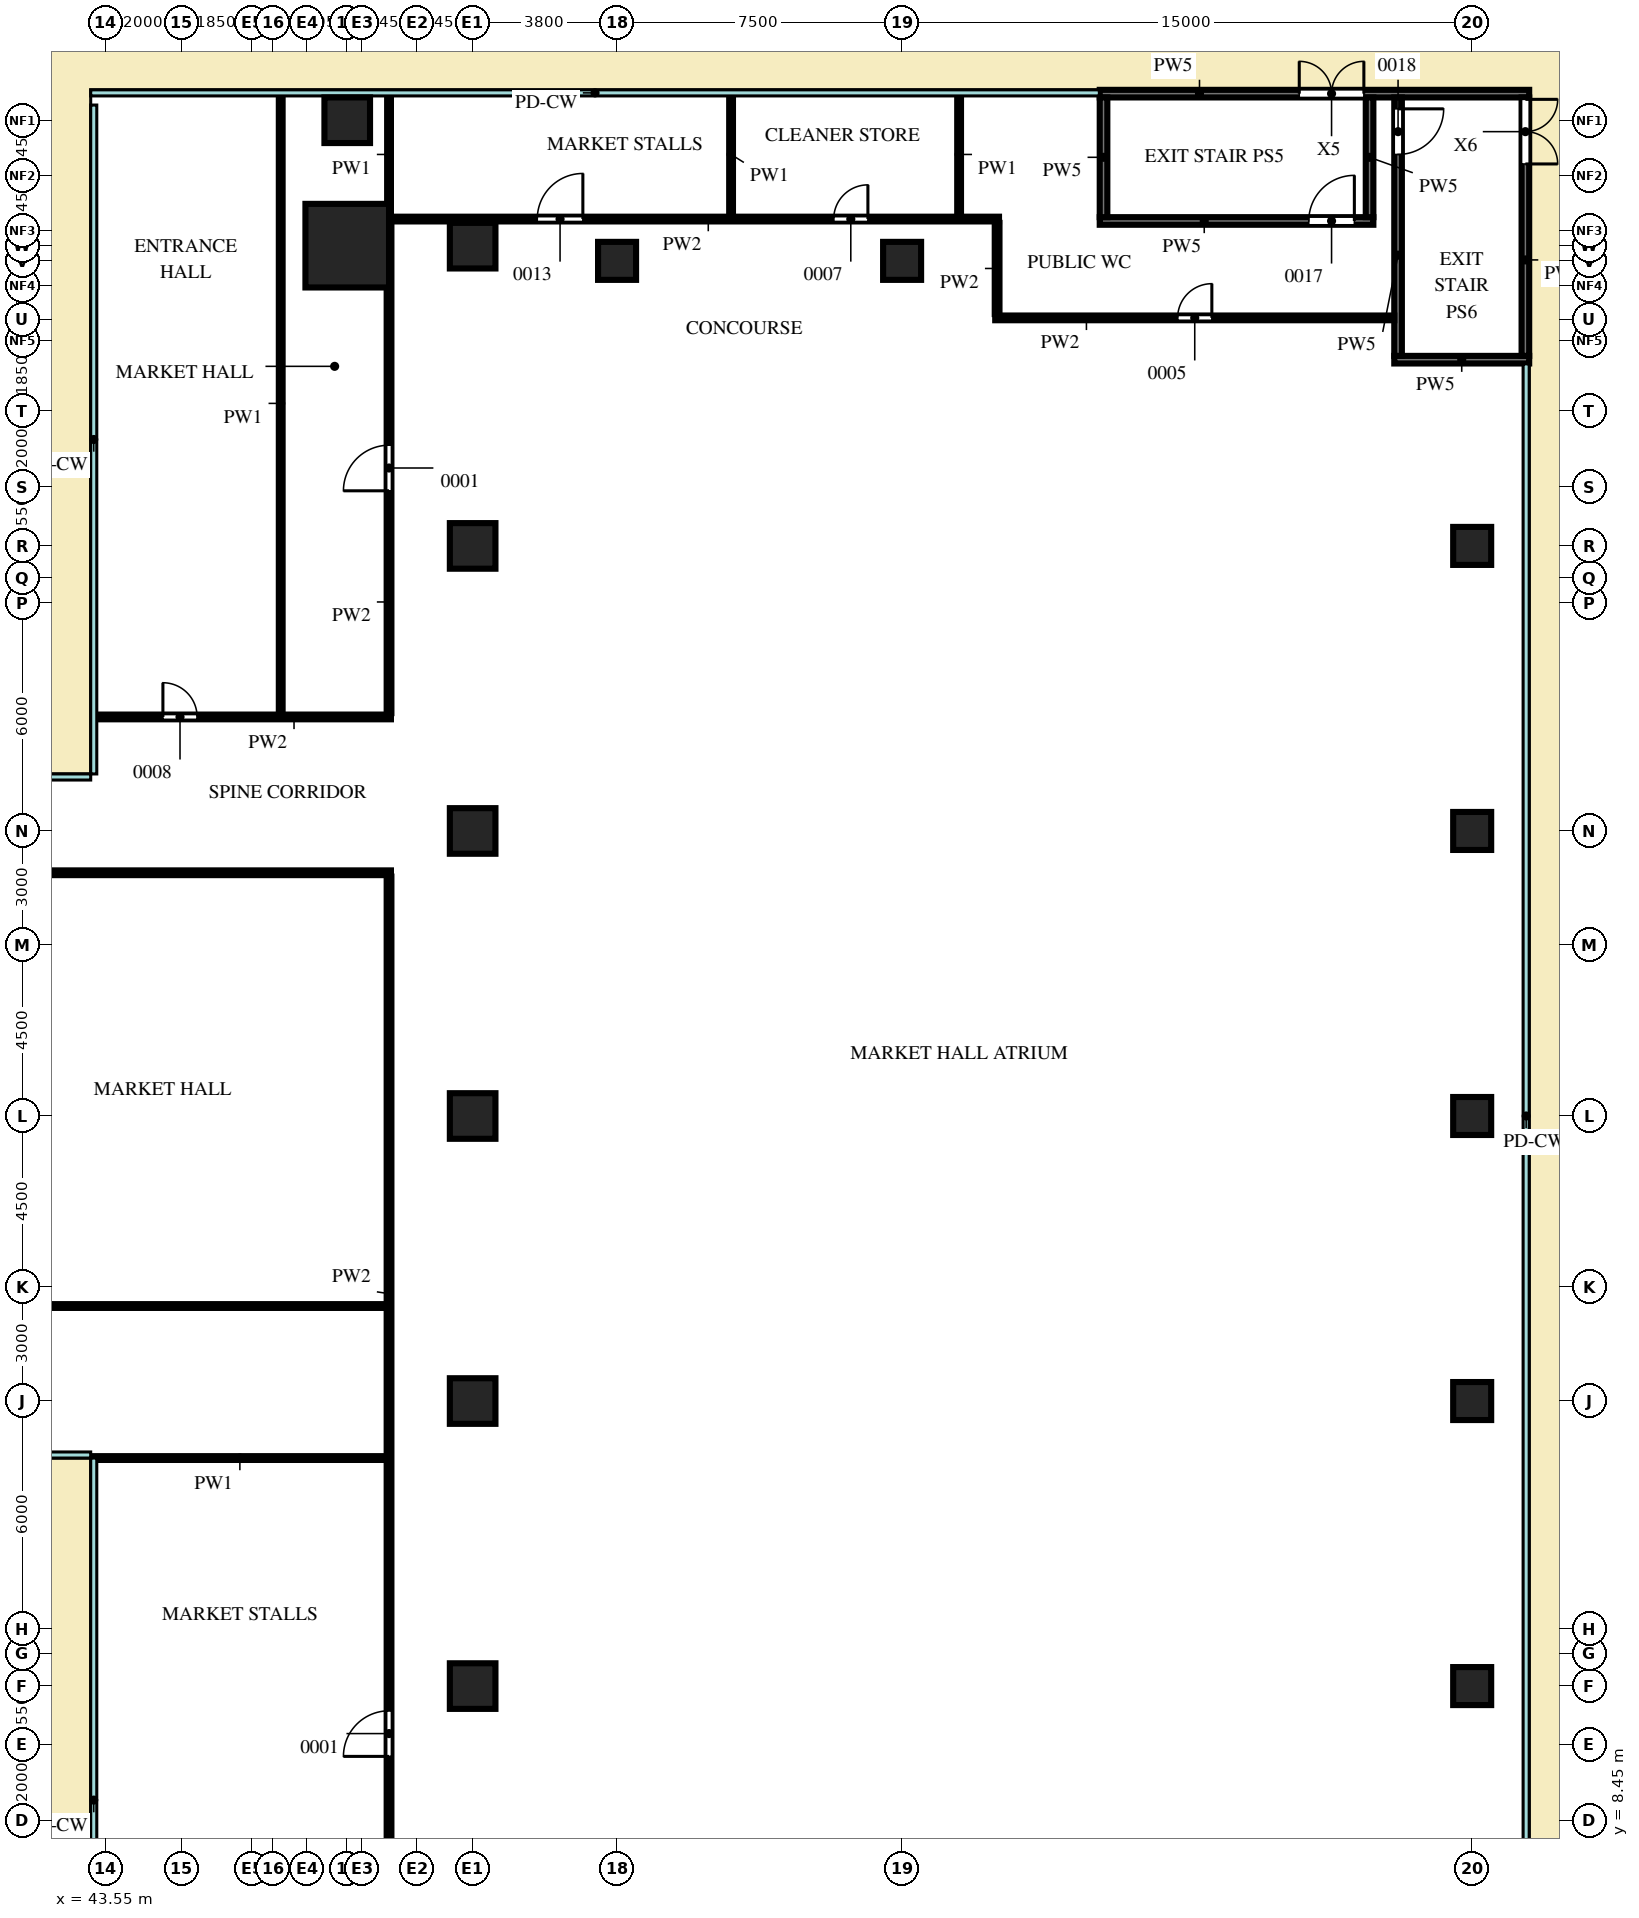
"""IFC4 building model, lengths in metres.
Left out: names, types, materials, properties, quantities, classifications, styles, units other than length and angle.
Written with IfcOpenShell. Run it as: python <this file> out.ifc"""

import sys

from ifc_helpers import new_model, si_unit, direction, frame, frame_2d, origin, origin_2d, place, context, subcontext, project, spatial, rectangle, extrude, source, transform, mapped, element, fill, save


model = new_model("IFC4")
c1 = context("Model", 3, precision=1e-05, world=origin(), true_north=direction((0.0, 1.0)))
c2 = subcontext(c1, "Body", "Model", "MODEL_VIEW")
j1 = project(units=[si_unit("LENGTHUNIT", "METRE"), si_unit("PLANEANGLEUNIT", "RADIAN")], contexts=[c1])
p1 = place(None, origin())
s1 = spatial("IfcSite", under=j1, at=p1, CompositionType="ELEMENT")
p2 = place(p1, origin())
s2 = spatial("IfcBuilding", under=s1, at=p2, CompositionType="ELEMENT")
p3 = place(p2, origin())
s3 = spatial("IfcBuildingStorey", under=s2, at=p3, CompositionType="ELEMENT", Elevation=0.0)
m1 = source(origin(), c2, "Body", "SweptSolid", [
    extrude(rectangle(XDim=2.2, YDim=2.2, at=origin_2d()), origin(), (0.0, 0.0, 1.0), 7.2),
])
p4 = place(p3, frame((49.9, 49.9, 0.0), z_axis=(0.0, 0.0, 1.0), x_axis=(1.0, 0.0, 0.0)))
e1 = element("IfcColumn", 1, at=p4, inside=s3, PredefinedType="COLUMN", context=c2, shape_type="MappedRepresentation", body=[
    mapped(m1, transform((0.0, 0.0, 0.0))),
])
m2 = source(origin(), c2, "Body", "SweptSolid", [
    extrude(rectangle(XDim=1.2, YDim=1.2, at=origin_2d()), origin(), (0.0, 0.0, 1.0), 7.2),
])
for number, where, z_axis, x_axis in (
    (2, (53.2, 12.0, 0.0), (0.0, 0.0, 1.0), (1.0, 0.0, 0.0)),
    (3, (53.2, 19.5, 0.0), (0.0, 0.0, 1.0), (1.0, 0.0, 0.0)),
    (4, (53.2, 27.0, 0.0), (0.0, 0.0, 1.0), (1.0, 0.0, 0.0)),
    (5, (53.2, 34.5, 0.0), (0.0, 0.0, 1.0), (1.0, 0.0, 0.0)),
    (6, (53.2, 42.0, 0.0), (0.0, 0.0, 1.0), (1.0, 0.0, 0.0)),
    (7, (53.2, 49.9, 0.0), (0.0, 0.0, 1.0), (1.0, 0.0, 0.0)),
    (8, (49.9, 53.2, 0.0), (0.0, 0.0, 1.0), (1.0, 0.0, 0.0)),
):
    element("IfcColumn", number, at=place(p3, frame(where, z_axis=z_axis, x_axis=x_axis)), inside=s3, PredefinedType="COLUMN", context=c2, shape_type="MappedRepresentation", body=[
        mapped(m2, transform((0.0, 0.0, 0.0))),
    ])
m3 = source(origin(), c2, "Body", "SweptSolid", [
    extrude(rectangle(XDim=1.0, YDim=1.0, at=origin_2d()), origin(), (0.0, 0.0, 1.0), 7.2),
])
for number, where, z_axis, x_axis in (
    (9, (57.0, 49.5, 0.0), (0.0, 0.0, 1.0), (1.0, 0.0, 0.0)),
    (10, (64.5, 49.5, 0.0), (0.0, 0.0, 1.0), (1.0, 0.0, 0.0)),
    (11, (79.5, 12.0, 0.0), (0.0, 0.0, 1.0), (1.0, 0.0, 0.0)),
    (12, (79.5, 19.5, 0.0), (0.0, 0.0, 1.0), (1.0, 0.0, 0.0)),
    (13, (79.5, 27.0, 0.0), (0.0, 0.0, 1.0), (1.0, 0.0, 0.0)),
    (14, (79.5, 34.5, 0.0), (0.0, 0.0, 1.0), (1.0, 0.0, 0.0)),
    (15, (79.5, 42.0, 0.0), (0.0, 0.0, 1.0), (1.0, 0.0, 0.0)),
):
    element("IfcColumn", number, at=place(p3, frame(where, z_axis=z_axis, x_axis=x_axis)), inside=s3, PredefinedType="COLUMN", context=c2, shape_type="MappedRepresentation", body=[
        mapped(m3, transform((0.0, 0.0, 0.0))),
    ])
m4 = source(origin(), c2, "Body", "SweptSolid", [
    extrude(rectangle(XDim=7.2, YDim=0.2, at=frame_2d((3.6, 0.0))), origin(), (0.0, 0.0, 1.0), 7.2),
])
p5 = place(p3, frame((69.7, 50.55, 0.0), z_axis=(0.0, 0.0, 1.0), x_axis=(1.0, 0.0, 0.0)))
e16 = element("IfcWall", 16, at=p5, inside=s3, PredefinedType="PARTITIONING", context=c2, shape_type="MappedRepresentation", body=[
    mapped(m4, transform((0.0, 0.0, 0.0))),
])
m5 = source(origin(), c2, "Body", "SweptSolid", [
    extrude(rectangle(XDim=1.2, YDim=2.1, at=frame_2d((0.6, 1.05))), frame((0.0, 0.11, 0.0), z_axis=(0.0, -1.0, 0.0), x_axis=(1.0, 0.0, 0.0)), (0.0, 0.0, 1.0), 0.22),
])
p6 = place(p5, frame((5.5, 0.0, 0.0)))
e17 = element("IfcOpeningElement", 17, at=p6, cuts=e16, PredefinedType="OPENING", context=c2, shape_type="MappedRepresentation", body=[
    mapped(m5, transform((0.0, 0.0, 0.0))),
])
m6 = source(origin(), c2, "Body", "SweptSolid", [
    extrude(rectangle(XDim=11.3, YDim=0.2, at=frame_2d((5.65, 0.0))), origin(), (0.0, 0.0, 1.0), 7.2),
])
p7 = place(p3, frame((69.7, 53.9, 0.0), z_axis=(0.0, 0.0, 1.0), x_axis=(1.0, 0.0, 0.0)))
e18 = element("IfcWall", 18, at=p7, inside=s3, PredefinedType="PARTITIONING", context=c2, shape_type="MappedRepresentation", body=[
    mapped(m6, transform((0.0, 0.0, 0.0))),
])
m7 = source(origin(), c2, "Body", "SweptSolid", [
    extrude(rectangle(XDim=1.7, YDim=2.4, at=frame_2d((0.85, 1.2))), frame((0.0, 0.11, 0.0), z_axis=(0.0, -1.0, 0.0), x_axis=(1.0, 0.0, 0.0)), (0.0, 0.0, 1.0), 0.22),
])
p8 = place(p7, frame((5.25, 0.0, 0.0)))
e19 = element("IfcOpeningElement", 19, at=p8, cuts=e18, PredefinedType="OPENING", context=c2, shape_type="MappedRepresentation", body=[
    mapped(m7, transform((0.0, 0.0, 0.0))),
])
m8 = source(origin(), c2, "Body", "SweptSolid", [
    extrude(rectangle(XDim=3.15, YDim=0.2, at=frame_2d((1.575, 0.0))), origin(), (0.0, 0.0, 1.0), 7.2),
])
for number, where, z_axis, x_axis in (
    (20, (69.8, 50.65, 0.0), (0.0, 0.0, 1.0), (0.0, 1.0, 0.0)),
    (21, (76.8, 50.65, 0.0), (0.0, 0.0, 1.0), (0.0, 1.0, 0.0)),
):
    element("IfcWall", number, at=place(p3, frame(where, z_axis=z_axis, x_axis=x_axis)), inside=s3, PredefinedType="PARTITIONING", context=c2, shape_type="MappedRepresentation", body=[
        mapped(m8, transform((0.0, 0.0, 0.0))),
    ])
m9 = source(origin(), c2, "Body", "SweptSolid", [
    extrude(rectangle(XDim=3.55, YDim=0.2, at=frame_2d((1.775, 0.0))), origin(), (0.0, 0.0, 1.0), 7.2),
])
p9 = place(p3, frame((77.45, 46.9, 0.0), z_axis=(0.0, 0.0, 1.0), x_axis=(1.0, 0.0, 0.0)))
e22 = element("IfcWall", 22, at=p9, inside=s3, PredefinedType="PARTITIONING", context=c2, shape_type="MappedRepresentation", body=[
    mapped(m9, transform((0.0, 0.0, 0.0))),
])
m10 = source(origin(), c2, "Body", "SweptSolid", [
    extrude(rectangle(XDim=6.8, YDim=0.2, at=frame_2d((3.4, 0.0))), origin(), (0.0, 0.0, 1.0), 7.2),
])
p10 = place(p3, frame((77.55, 47.0, 0.0), z_axis=(0.0, 0.0, 1.0), x_axis=(0.0, 1.0, 0.0)))
e23 = element("IfcWall", 23, at=p10, inside=s3, PredefinedType="PARTITIONING", context=c2, shape_type="MappedRepresentation", body=[
    mapped(m10, transform((0.0, 0.0, 0.0))),
])
p11 = place(p10, frame((5.3, 0.0, 0.0)))
e24 = element("IfcOpeningElement", 24, at=p11, cuts=e23, PredefinedType="OPENING", context=c2, shape_type="MappedRepresentation", body=[
    mapped(m5, transform((0.0, 0.0, 0.0))),
])
p12 = place(p3, frame((80.9, 47.0, 0.0), z_axis=(0.0, 0.0, 1.0), x_axis=(0.0, 1.0, 0.0)))
e25 = element("IfcWall", 25, at=p12, inside=s3, PredefinedType="PARTITIONING", context=c2, shape_type="MappedRepresentation", body=[
    mapped(m10, transform((0.0, 0.0, 0.0))),
])
p13 = place(p12, frame((6.75, 0.0, 0.0), z_axis=(0.0, 0.0, 1.0), x_axis=(-1.0, 0.0, 0.0)))
e26 = element("IfcOpeningElement", 26, at=p13, cuts=e25, PredefinedType="OPENING", context=c2, shape_type="MappedRepresentation", body=[
    mapped(m7, transform((0.0, 0.0, 0.0))),
])
m11 = source(origin(), c2, "Body", "SweptSolid", [
    extrude(rectangle(XDim=29.7, YDim=0.125, at=frame_2d((14.85, 0.0))), origin(), (0.0, 0.0, 1.0), 7.2),
])
p14 = place(p3, frame((51.0, 3.6, 0.0), z_axis=(0.0, 0.0, 1.0), x_axis=(0.0, 1.0, 0.0)))
e27 = element("IfcWall", 27, at=p14, inside=s3, PredefinedType="PARTITIONING", context=c2, shape_type="MappedRepresentation", body=[
    mapped(m11, transform((0.0, 0.0, 0.0))),
])
m12 = source(origin(), c2, "Body", "SweptSolid", [
    extrude(rectangle(XDim=1.2, YDim=2.1, at=frame_2d((0.6, 1.05))), frame((0.0, 0.073, 0.0), z_axis=(0.0, -1.0, 0.0), x_axis=(1.0, 0.0, 0.0)), (0.0, 0.0, 1.0), 0.145),
])
p15 = place(p14, frame((6.55, 0.0, 0.0)))
e28 = element("IfcOpeningElement", 28, at=p15, cuts=e27, PredefinedType="OPENING", context=c2, shape_type="MappedRepresentation", body=[
    mapped(m12, transform((0.0, 0.0, 0.0))),
])
m13 = source(origin(), c2, "Body", "SweptSolid", [
    extrude(rectangle(XDim=7.65, YDim=0.1, at=frame_2d((3.825, 0.0))), origin(), (0.0, 0.0, 1.0), 7.2),
])
p16 = place(p3, frame((43.25, 18.0, 0.0), z_axis=(0.0, 0.0, 1.0), x_axis=(1.0, 0.0, 0.0)))
e29 = element("IfcWall", 29, at=p16, inside=s3, PredefinedType="PARTITIONING", context=c2, shape_type="MappedRepresentation", body=[
    mapped(m13, transform((0.0, 0.0, 0.0))),
])
m14 = source(origin(), c2, "Body", "SweptSolid", [
    extrude(rectangle(XDim=24.4, YDim=0.1, at=frame_2d((12.2, 0.0))), origin(), (0.0, 0.0, 1.0), 7.2),
])
p17 = place(p3, frame((26.5, 22.0, 0.0), z_axis=(0.0, 0.0, 1.0), x_axis=(1.0, 0.0, 0.0)))
e30 = element("IfcWall", 30, at=p17, inside=s3, PredefinedType="PARTITIONING", context=c2, shape_type="MappedRepresentation", body=[
    mapped(m14, transform((0.0, 0.0, 0.0))),
])
m15 = source(origin(), c2, "Body", "SweptSolid", [
    extrude(rectangle(XDim=24.7, YDim=0.125, at=frame_2d((12.35, 0.0))), origin(), (0.0, 0.0, 1.0), 7.2),
])
p18 = place(p3, frame((26.35, 33.4, 0.0), z_axis=(0.0, 0.0, 1.0), x_axis=(1.0, 0.0, 0.0)))
e31 = element("IfcWall", 31, at=p18, inside=s3, PredefinedType="PARTITIONING", context=c2, shape_type="MappedRepresentation", body=[
    mapped(m15, transform((0.0, 0.0, 0.0))),
])
p19 = place(p18, frame((12.25, 0.0, 0.0)))
e32 = element("IfcOpeningElement", 32, at=p19, cuts=e31, PredefinedType="OPENING", context=c2, shape_type="MappedRepresentation", body=[
    mapped(m12, transform((0.0, 0.0, 0.0))),
])
m16 = source(origin(), c2, "Body", "SweptSolid", [
    extrude(rectangle(XDim=7.8, YDim=0.125, at=frame_2d((3.9, 0.0))), origin(), (0.0, 0.0, 1.0), 7.2),
])
p20 = place(p3, frame((43.25, 37.5, 0.0), z_axis=(0.0, 0.0, 1.0), x_axis=(1.0, 0.0, 0.0)))
e33 = element("IfcWall", 33, at=p20, inside=s3, PredefinedType="PARTITIONING", context=c2, shape_type="MappedRepresentation", body=[
    mapped(m16, transform((0.0, 0.0, 0.0))),
])
m17 = source(origin(), c2, "Body", "SweptSolid", [
    extrude(rectangle(XDim=0.9, YDim=2.1, at=frame_2d((0.45, 1.05))), frame((0.0, 0.073, 0.0), z_axis=(0.0, -1.0, 0.0), x_axis=(1.0, 0.0, 0.0)), (0.0, 0.0, 1.0), 0.145),
])
p21 = place(p20, frame((1.8, 0.0, 0.0)))
e34 = element("IfcOpeningElement", 34, at=p21, cuts=e33, PredefinedType="OPENING", context=c2, shape_type="MappedRepresentation", body=[
    mapped(m17, transform((0.0, 0.0, 0.0))),
])
m18 = source(origin(), c2, "Body", "SweptSolid", [
    extrude(rectangle(XDim=16.3, YDim=0.1, at=frame_2d((8.15, 0.0))), origin(), (0.0, 0.0, 1.0), 7.2),
])
p22 = place(p3, frame((48.15, 37.6, 0.0), z_axis=(0.0, 0.0, 1.0), x_axis=(0.0, 1.0, 0.0)))
e35 = element("IfcWall", 35, at=p22, inside=s3, PredefinedType="PARTITIONING", context=c2, shape_type="MappedRepresentation", body=[
    mapped(m18, transform((0.0, 0.0, 0.0))),
])
m19 = source(origin(), c2, "Body", "SweptSolid", [
    extrude(rectangle(XDim=12.9, YDim=0.125, at=frame_2d((6.45, 0.0))), origin(), (0.0, 0.0, 1.0), 7.2),
])
p23 = place(p3, frame((51.0, 37.6, 0.0), z_axis=(0.0, 0.0, 1.0), x_axis=(0.0, 1.0, 0.0)))
e36 = element("IfcWall", 36, at=p23, inside=s3, PredefinedType="PARTITIONING", context=c2, shape_type="MappedRepresentation", body=[
    mapped(m19, transform((0.0, 0.0, 0.0))),
])
p24 = place(p23, frame((5.85, 0.0, 0.0)))
e37 = element("IfcOpeningElement", 37, at=p24, cuts=e36, PredefinedType="OPENING", context=c2, shape_type="MappedRepresentation", body=[
    mapped(m12, transform((0.0, 0.0, 0.0))),
])
m20 = source(origin(), c2, "Body", "SweptSolid", [
    extrude(rectangle(XDim=10.5, YDim=0.125, at=frame_2d((5.25, 0.0))), origin(), (0.0, 0.0, 1.0), 7.2),
])
p25 = place(p3, frame((66.95, 48.0, 0.0), z_axis=(0.0, 0.0, 1.0), x_axis=(1.0, 0.0, 0.0)))
e38 = element("IfcWall", 38, at=p25, inside=s3, PredefinedType="PARTITIONING", context=c2, shape_type="MappedRepresentation", body=[
    mapped(m20, transform((0.0, 0.0, 0.0))),
])
p26 = place(p25, frame((4.8, 0.0, 0.0)))
e39 = element("IfcOpeningElement", 39, at=p26, cuts=e38, PredefinedType="OPENING", context=c2, shape_type="MappedRepresentation", body=[
    mapped(m17, transform((0.0, 0.0, 0.0))),
])
m21 = source(origin(), c2, "Body", "SweptSolid", [
    extrude(rectangle(XDim=2.4, YDim=0.125, at=frame_2d((1.2, 0.0))), origin(), (0.0, 0.0, 1.0), 7.2),
])
p27 = place(p3, frame((67.0, 48.1, 0.0), z_axis=(0.0, 0.0, 1.0), x_axis=(0.0, 1.0, 0.0)))
e40 = element("IfcWall", 40, at=p27, inside=s3, PredefinedType="PARTITIONING", context=c2, shape_type="MappedRepresentation", body=[
    mapped(m21, transform((0.0, 0.0, 0.0))),
])
m22 = source(origin(), c2, "Body", "SweptSolid", [
    extrude(rectangle(XDim=16.1, YDim=0.125, at=frame_2d((8.05, 0.0))), origin(), (0.0, 0.0, 1.0), 7.2),
])
p28 = place(p3, frame((50.95, 50.6, 0.0), z_axis=(0.0, 0.0, 1.0), x_axis=(1.0, 0.0, 0.0)))
e41 = element("IfcWall", 41, at=p28, inside=s3, PredefinedType="PARTITIONING", context=c2, shape_type="MappedRepresentation", body=[
    mapped(m22, transform((0.0, 0.0, 0.0))),
])
p29 = place(p28, frame((3.95, 0.0, 0.0)))
e42 = element("IfcOpeningElement", 42, at=p29, cuts=e41, PredefinedType="OPENING", context=c2, shape_type="MappedRepresentation", body=[
    mapped(m12, transform((0.0, 0.0, 0.0))),
])
p30 = place(p28, frame((11.75, 0.0, 0.0)))
e43 = element("IfcOpeningElement", 43, at=p30, cuts=e41, PredefinedType="OPENING", context=c2, shape_type="MappedRepresentation", body=[
    mapped(m17, transform((0.0, 0.0, 0.0))),
])
m23 = source(origin(), c2, "Body", "SweptSolid", [
    extrude(rectangle(XDim=3.2, YDim=0.1, at=frame_2d((1.6, 0.0))), origin(), (0.0, 0.0, 1.0), 7.2),
])
for number, where, z_axis, x_axis in (
    (44, (51.0, 50.7, 0.0), (0.0, 0.0, 1.0), (0.0, 1.0, 0.0)),
    (45, (60.0, 50.7, 0.0), (0.0, 0.0, 1.0), (0.0, 1.0, 0.0)),
    (46, (66.0, 50.7, 0.0), (0.0, 0.0, 1.0), (0.0, 1.0, 0.0)),
):
    element("IfcWall", number, at=place(p3, frame(where, z_axis=z_axis, x_axis=x_axis)), inside=s3, PredefinedType="PARTITIONING", context=c2, shape_type="MappedRepresentation", body=[
        mapped(m23, transform((0.0, 0.0, 0.0))),
    ])
m24 = source(origin(), c2, "Body", "SweptSolid", [
    extrude(rectangle(XDim=1.2, YDim=2.1, at=frame_2d((0.6, 1.05))), frame((0.0, 0.025, 0.0), z_axis=(0.0, -1.0, 0.0), x_axis=(1.0, 0.0, 0.0)), (0.0, 0.0, 1.0), 0.05),
])
p31 = place(p15, origin())
e47 = element("IfcDoor", 47, at=p31, inside=s3, OperationType="SINGLE_SWING_RIGHT", PredefinedType="DOOR", context=c2, shape_type="MappedRepresentation", body=[
    mapped(m24, transform((0.0, 0.0, 0.0))),
])
fill(e28, e47)
m25 = source(origin(), c2, "Body", "SweptSolid", [
    extrude(rectangle(XDim=0.9, YDim=2.1, at=frame_2d((0.45, 1.05))), frame((0.0, 0.025, 0.0), z_axis=(0.0, -1.0, 0.0), x_axis=(1.0, 0.0, 0.0)), (0.0, 0.0, 1.0), 0.05),
])
p32 = place(p21, origin())
e48 = element("IfcDoor", 48, at=p32, inside=s3, OperationType="SINGLE_SWING_RIGHT", PredefinedType="DOOR", context=c2, shape_type="MappedRepresentation", body=[
    mapped(m25, transform((0.0, 0.0, 0.0))),
])
fill(e34, e48)
p33 = place(p24, origin())
e49 = element("IfcDoor", 49, at=p33, inside=s3, OperationType="SINGLE_SWING_RIGHT", PredefinedType="DOOR", context=c2, shape_type="MappedRepresentation", body=[
    mapped(m24, transform((0.0, 0.0, 0.0))),
])
fill(e37, e49)
p34 = place(p29, origin())
e50 = element("IfcDoor", 50, at=p34, inside=s3, OperationType="SINGLE_SWING_LEFT", PredefinedType="DOOR", context=c2, shape_type="MappedRepresentation", body=[
    mapped(m24, transform((0.0, 0.0, 0.0))),
])
fill(e42, e50)
p35 = place(p30, origin())
e51 = element("IfcDoor", 51, at=p35, inside=s3, OperationType="SINGLE_SWING_LEFT", PredefinedType="DOOR", context=c2, shape_type="MappedRepresentation", body=[
    mapped(m25, transform((0.0, 0.0, 0.0))),
])
fill(e43, e51)
p36 = place(p26, origin())
e52 = element("IfcDoor", 52, at=p36, inside=s3, OperationType="SINGLE_SWING_LEFT", PredefinedType="DOOR", context=c2, shape_type="MappedRepresentation", body=[
    mapped(m25, transform((0.0, 0.0, 0.0))),
])
fill(e39, e52)
p37 = place(p6, origin())
e53 = element("IfcDoor", 53, at=p37, inside=s3, OperationType="SINGLE_SWING_LEFT", PredefinedType="DOOR", context=c2, shape_type="MappedRepresentation", body=[
    mapped(m24, transform((0.0, 0.0, 0.0))),
])
fill(e17, e53)
p38 = place(p11, origin())
e54 = element("IfcDoor", 54, at=p38, inside=s3, OperationType="SINGLE_SWING_RIGHT", PredefinedType="DOOR", context=c2, shape_type="MappedRepresentation", body=[
    mapped(m24, transform((0.0, 0.0, 0.0))),
])
fill(e24, e54)
m26 = source(origin(), c2, "Body", "SweptSolid", [
    extrude(rectangle(XDim=1.7, YDim=2.4, at=frame_2d((0.85, 1.2))), frame((0.0, 0.025, 0.0), z_axis=(0.0, -1.0, 0.0), x_axis=(1.0, 0.0, 0.0)), (0.0, 0.0, 1.0), 0.05),
])
p39 = place(p8, origin())
e55 = element("IfcDoor", 55, at=p39, inside=s3, OperationType="DOUBLE_DOOR_SINGLE_SWING", PredefinedType="DOOR", context=c2, shape_type="MappedRepresentation", body=[
    mapped(m26, transform((0.0, 0.0, 0.0))),
])
fill(e19, e55)
p40 = place(p13, origin())
e56 = element("IfcDoor", 56, at=p40, inside=s3, OperationType="DOUBLE_DOOR_SINGLE_SWING", PredefinedType="DOOR", context=c2, shape_type="MappedRepresentation", body=[
    mapped(m26, transform((0.0, 0.0, 0.0))),
])
fill(e26, e56)
save(model, sys.argv[1])
